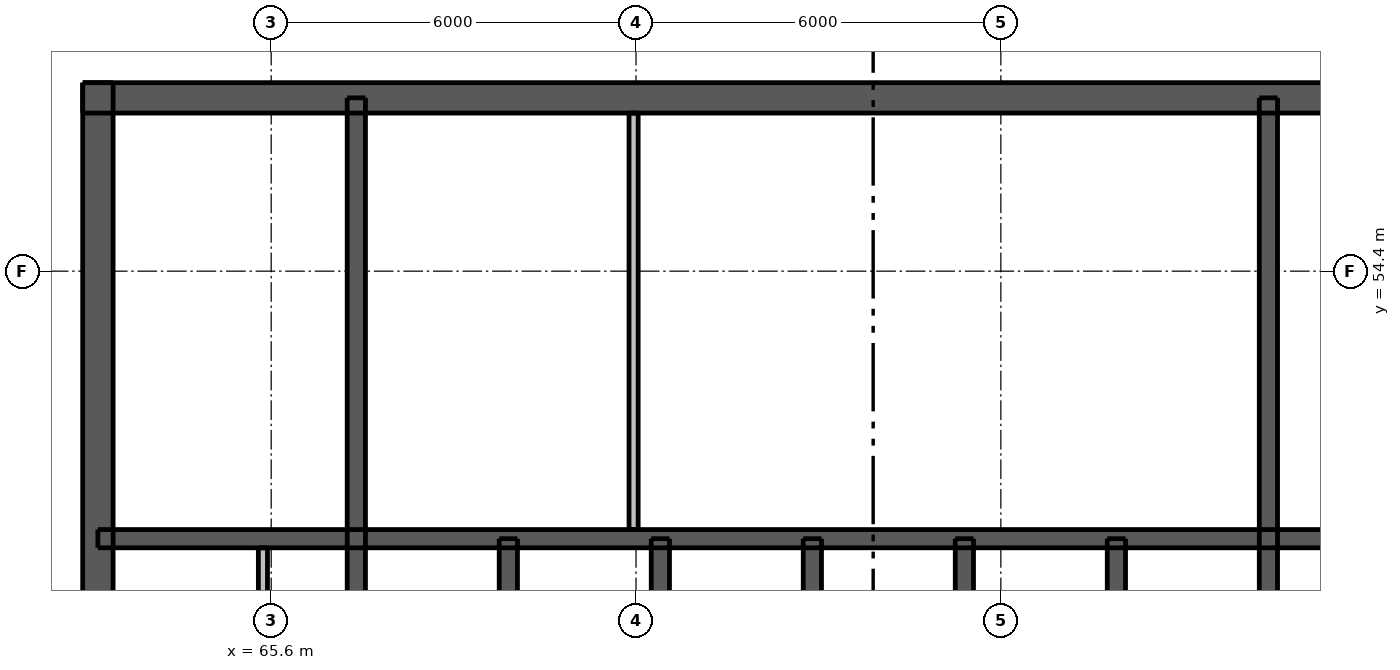
"""IFC4 building model, lengths in metres.
Left out: names, types, materials, properties, quantities, classifications, styles, units other than length and angle.
Written with IfcOpenShell. Run it as: python <this file> out.ifc"""

import sys

from ifc_helpers import new_model, si_unit, direction, frame, frame_2d, origin, place, context, subcontext, project, spatial, rectangle, extrude, element, fill, save


model = new_model("IFC4")
c1 = context("Model", 3, precision=1e-05, world=origin(), true_north=direction((0.0, 1.0)))
c2 = subcontext(c1, "Body", "Model", "MODEL_VIEW")
j1 = project(units=[si_unit("LENGTHUNIT", "METRE"), si_unit("PLANEANGLEUNIT", "RADIAN")], contexts=[c1])
p1 = place(None, origin())
s1 = spatial("IfcSite", under=j1, at=p1, CompositionType="ELEMENT")
p2 = place(p1, origin())
s2 = spatial("IfcBuilding", under=s1, at=p2, CompositionType="ELEMENT")
p3 = place(p2, frame((0.0, 0.0, 268.6)))
s3 = spatial("IfcBuildingStorey", under=s2, at=p3, CompositionType="ELEMENT", Elevation=268.6)
p4 = place(p3, frame((62.5, 57.25, 0.0), z_axis=(0.0, 0.0, 1.0), x_axis=(1.0, 0.0, 0.0)))
e1 = element("IfcWall", 1, at=p4, inside=s3, PredefinedType="SHEAR", context=c2, shape_type="SweptSolid", body=[
    extrude(rectangle(XDim=24.0, YDim=0.5, at=frame_2d((12.0, 0.0))), origin(), (0.0, 0.0, 1.0), 3.05),
])
p5 = place(p4, frame((21.025, 0.0, 0.0)))
e2 = element("IfcOpeningElement", 2, at=p5, cuts=e1, PredefinedType="OPENING", context=c2, shape_type="SweptSolid", body=[
    extrude(rectangle(XDim=1.1, YDim=2.1, at=frame_2d((0.55, 1.05))), frame((0.0, 0.26, 0.0), z_axis=(0.0, -1.0, 0.0), x_axis=(1.0, 0.0, 0.0)), (0.0, 0.0, 1.0), 0.52),
])
p6 = place(p4, frame((1.875, 0.0, 0.0)))
e3 = element("IfcOpeningElement", 3, at=p6, cuts=e1, PredefinedType="OPENING", context=c2, shape_type="SweptSolid", body=[
    extrude(rectangle(XDim=1.1, YDim=2.1, at=frame_2d((0.55, 1.05))), frame((0.0, 0.26, 0.0), z_axis=(0.0, -1.0, 0.0), x_axis=(1.0, 0.0, 0.0)), (0.0, 0.0, 1.0), 0.52),
])
p7 = place(p4, frame((6.405, 0.0, 0.0)))
e4 = element("IfcOpeningElement", 4, at=p7, cuts=e1, PredefinedType="OPENING", context=c2, shape_type="SweptSolid", body=[
    extrude(rectangle(XDim=0.9, YDim=2.1, at=frame_2d((0.45, 1.05))), frame((0.0, 0.26, 0.0), z_axis=(0.0, -1.0, 0.0), x_axis=(1.0, 0.0, 0.0)), (0.0, 0.0, 1.0), 0.52),
])
p8 = place(p4, frame((13.755, 0.0, 0.0)))
e5 = element("IfcOpeningElement", 5, at=p8, cuts=e1, PredefinedType="OPENING", context=c2, shape_type="SweptSolid", body=[
    extrude(rectangle(XDim=0.9, YDim=2.1, at=frame_2d((0.45, 1.05))), frame((0.0, 0.26, 0.0), z_axis=(0.0, -1.0, 0.0), x_axis=(1.0, 0.0, 0.0)), (0.0, 0.0, 1.0), 0.52),
])
p9 = place(p3, frame((62.75, 33.5, 0.0), z_axis=(0.0, 0.0, 1.0), x_axis=(0.0, 1.0, 0.0)))
e6 = element("IfcWall", 6, at=p9, inside=s3, PredefinedType="SHEAR", context=c2, shape_type="SweptSolid", body=[
    extrude(rectangle(XDim=24.0, YDim=0.5, at=frame_2d((12.0, 0.0))), origin(), (0.0, 0.0, 1.0), 3.05),
])
p10 = place(p9, frame((11.2, 0.0, 0.0)))
e7 = element("IfcOpeningElement", 7, at=p10, cuts=e6, PredefinedType="OPENING", context=c2, shape_type="SweptSolid", body=[
    extrude(rectangle(XDim=1.6, YDim=2.1, at=frame_2d((0.8, 1.05))), frame((0.0, 0.26, 0.0), z_axis=(0.0, -1.0, 0.0), x_axis=(1.0, 0.0, 0.0)), (0.0, 0.0, 1.0), 0.52),
])
p11 = place(p3, frame((62.75, 50.0, 0.0), z_axis=(0.0, 0.0, 1.0), x_axis=(1.0, 0.0, 0.0)))
e8 = element("IfcWall", 8, at=p11, inside=s3, PredefinedType="SHEAR", context=c2, shape_type="SweptSolid", body=[
    extrude(rectangle(XDim=23.5, YDim=0.3, at=frame_2d((11.75, 0.0))), origin(), (0.0, 0.0, 1.0), 3.05),
])
for number, where, z_axis, x_axis in (
    (9, (67.0, 47.1, 0.0), (0.0, 0.0, 1.0), (0.0, 1.0, 0.0)),
    (10, (82.0, 47.1, 0.0), (0.0, 0.0, 1.0), (0.0, 1.0, 0.0)),
):
    element("IfcWall", number, at=place(p3, frame(where, z_axis=z_axis, x_axis=x_axis)), inside=s3, PredefinedType="SHEAR", context=c2, shape_type="SweptSolid", body=[
        extrude(rectangle(XDim=10.15, YDim=0.3, at=frame_2d((5.075, 0.0))), origin(), (0.0, 0.0, 1.0), 3.05),
    ])
for number, where, z_axis, x_axis in (
    (11, (69.5, 47.1, 0.0), (0.0, 0.0, 1.0), (0.0, 1.0, 0.0)),
    (12, (72.0, 47.1, 0.0), (0.0, 0.0, 1.0), (0.0, 1.0, 0.0)),
    (13, (74.5, 47.1, 0.0), (0.0, 0.0, 1.0), (0.0, 1.0, 0.0)),
    (14, (77.0, 47.1, 0.0), (0.0, 0.0, 1.0), (0.0, 1.0, 0.0)),
    (15, (79.5, 47.1, 0.0), (0.0, 0.0, 1.0), (0.0, 1.0, 0.0)),
):
    element("IfcWall", number, at=place(p3, frame(where, z_axis=z_axis, x_axis=x_axis)), inside=s3, PredefinedType="SHEAR", context=c2, shape_type="SweptSolid", body=[
        extrude(rectangle(XDim=2.9, YDim=0.3, at=frame_2d((1.45, 0.0))), origin(), (0.0, 0.0, 1.0), 3.05),
    ])
p12 = place(p3, frame((65.464, 47.25, 0.0), z_axis=(0.0, 0.0, 1.0), x_axis=(0.0, 1.0, 0.0)))
e16 = element("IfcWall", 16, at=p12, inside=s3, PredefinedType="PLUMBINGWALL", context=c2, shape_type="SweptSolid", body=[
    extrude(rectangle(XDim=2.6, YDim=0.15, at=frame_2d((1.3, 0.0))), origin(), (0.0, 0.0, 1.0), 3.05),
])
p13 = place(p3, frame((71.56, 50.15, 0.0), z_axis=(0.0, 0.0, 1.0), x_axis=(0.0, 1.0, 0.0)))
e17 = element("IfcWall", 17, at=p13, inside=s3, PredefinedType="PLUMBINGWALL", context=c2, shape_type="SweptSolid", body=[
    extrude(rectangle(XDim=6.85, YDim=0.15, at=frame_2d((3.425, 0.0))), origin(), (0.0, 0.0, 1.0), 3.05),
])
p14 = place(p6, origin())
e18 = element("IfcDoor", 18, at=p14, inside=s3, OperationType="SINGLE_SWING_LEFT", PredefinedType="DOOR", context=c2, shape_type="SweptSolid", body=[
    extrude(rectangle(XDim=1.1, YDim=2.1, at=frame_2d((0.55, 1.05))), frame((0.0, -0.188, 0.0), z_axis=(0.0, -1.0, 0.0), x_axis=(1.0, 0.0, 0.0)), (0.0, 0.0, 1.0), 0.05),
])
fill(e3, e18)
p15 = place(p7, origin())
e19 = element("IfcDoor", 19, at=p15, inside=s3, OperationType="SINGLE_SWING_RIGHT", PredefinedType="DOOR", context=c2, shape_type="SweptSolid", body=[
    extrude(rectangle(XDim=0.9, YDim=2.1, at=frame_2d((0.45, 1.05))), frame((0.0, -0.188, 0.0), z_axis=(0.0, -1.0, 0.0), x_axis=(1.0, 0.0, 0.0)), (0.0, 0.0, 1.0), 0.05),
])
fill(e4, e19)
p16 = place(p8, origin())
e20 = element("IfcDoor", 20, at=p16, inside=s3, OperationType="SINGLE_SWING_RIGHT", PredefinedType="DOOR", context=c2, shape_type="SweptSolid", body=[
    extrude(rectangle(XDim=0.9, YDim=2.1, at=frame_2d((0.45, 1.05))), frame((0.0, -0.188, 0.0), z_axis=(0.0, -1.0, 0.0), x_axis=(1.0, 0.0, 0.0)), (0.0, 0.0, 1.0), 0.05),
])
fill(e5, e20)
save(model, sys.argv[1])
